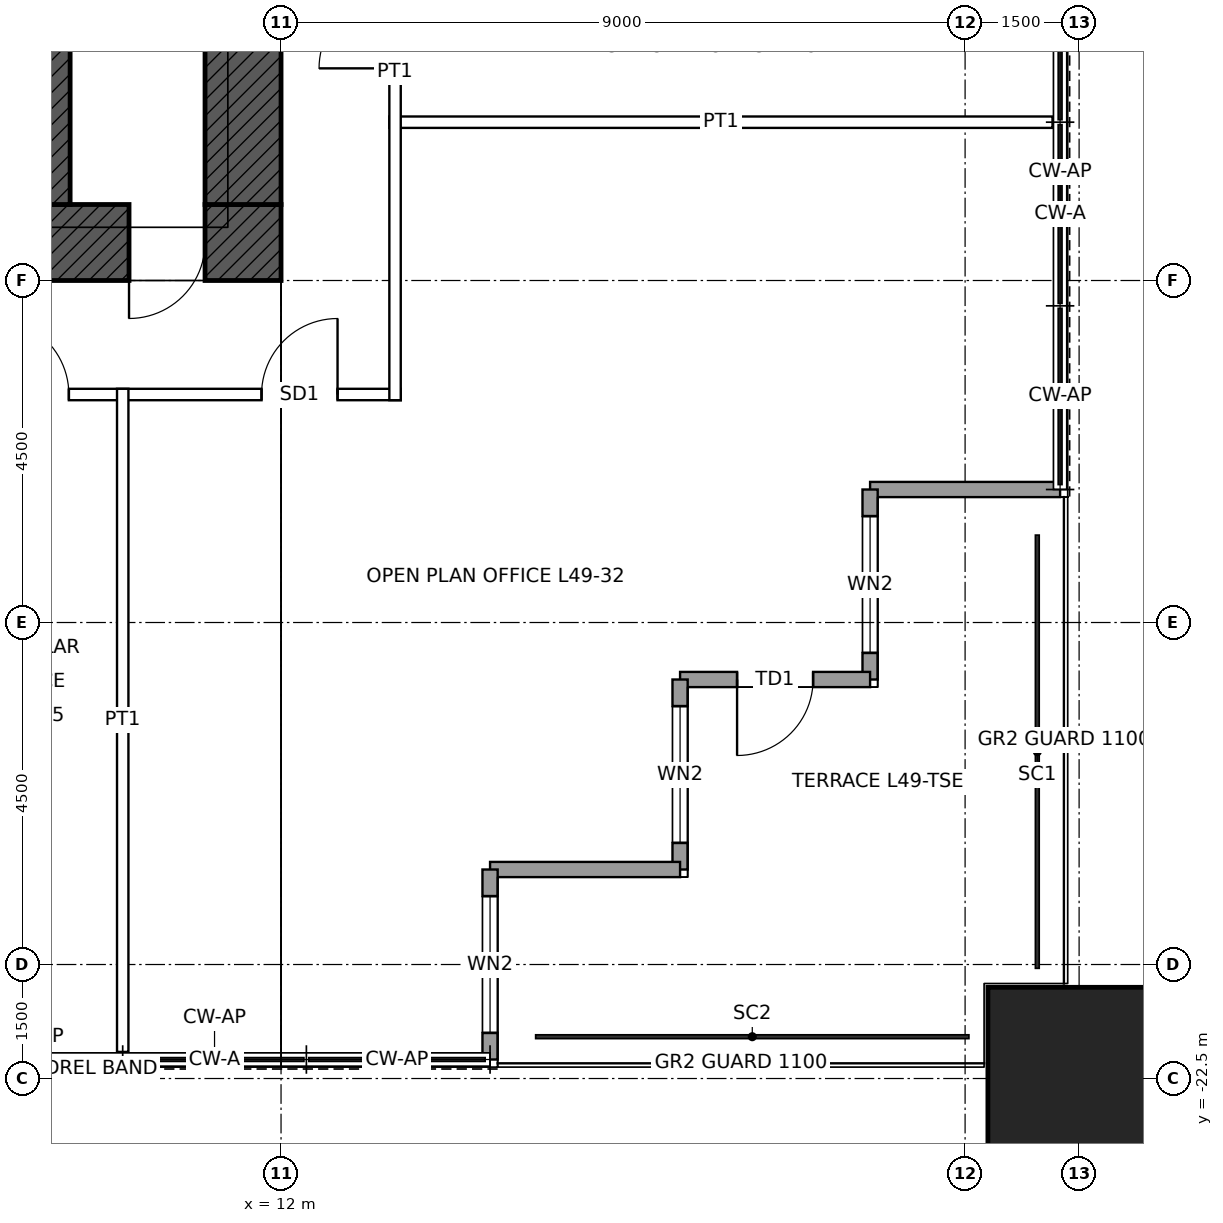
"""IFC4 building model, lengths in metres.
Left out: names, types, materials, properties, quantities, classifications, styles, units other than length and angle.
Written with IfcOpenShell. Run it as: python <this file> out.ifc"""

import sys

from ifc_helpers import new_model, si_unit, direction, frame, frame_2d, origin, origin_2d, place, context, subcontext, project, spatial, rectangle, hollow_rectangle, extrude, element, fill, save


model = new_model("IFC4")
c1 = context("Model", 3, precision=1e-05, world=origin(), true_north=direction((0.0, 1.0)))
c2 = subcontext(c1, "Body", "Model", "MODEL_VIEW")
j1 = project(units=[si_unit("LENGTHUNIT", "METRE"), si_unit("PLANEANGLEUNIT", "RADIAN")], contexts=[c1])
p1 = place(None, origin())
s1 = spatial("IfcSite", under=j1, at=p1, CompositionType="ELEMENT")
p2 = place(p1, origin())
s2 = spatial("IfcBuilding", under=s1, at=p2, CompositionType="ELEMENT")
p3 = place(p2, frame((0.0, 0.0, 229.9)))
s3 = spatial("IfcBuildingStorey", under=s2, at=p3, CompositionType="ELEMENT", Elevation=229.9)
p4 = place(p3, frame((22.5, -22.5, 0.0), z_axis=(0.0, 0.0, 1.0), x_axis=(1.0, 0.0, 0.0)))
e1 = element("IfcColumn", 1, at=p4, inside=s3, PredefinedType="COLUMN", context=c2, shape_type="SweptSolid", body=[
    extrude(hollow_rectangle(XDim=2.4, YDim=2.4, WallThickness=0.12, at=origin_2d()), origin(), (0.0, 0.0, 1.0), 4.0),
])
p5 = place(p3, frame((12.0, -11.5, 0.0), z_axis=(0.0, 0.0, 1.0), x_axis=(-1.0, 0.0, 0.0)))
e2 = element("IfcWall", 2, at=p5, inside=s3, PredefinedType="SHEAR", context=c2, shape_type="SweptSolid", body=[
    extrude(rectangle(XDim=24.0, YDim=1.0, at=frame_2d((12.0, 0.0))), origin(), (0.0, 0.0, 1.0), 4.0),
])
p6 = place(p5, frame((11.5, 0.0, 0.0)))
e3 = element("IfcOpeningElement", 3, at=p6, cuts=e2, PredefinedType="OPENING", context=c2, shape_type="SweptSolid", body=[
    extrude(rectangle(XDim=1.0, YDim=2.1, at=frame_2d((0.5, 1.05))), frame((0.0, 0.51, 0.0), z_axis=(0.0, -1.0, 0.0), x_axis=(1.0, 0.0, 0.0)), (0.0, 0.0, 1.0), 1.02),
])
p7 = place(p5, frame((1.0, 0.0, 0.0)))
e4 = element("IfcOpeningElement", 4, at=p7, cuts=e2, PredefinedType="OPENING", context=c2, shape_type="SweptSolid", body=[
    extrude(rectangle(XDim=1.0, YDim=2.4, at=frame_2d((0.5, 1.2))), frame((0.0, 0.51, 0.0), z_axis=(0.0, -1.0, 0.0), x_axis=(1.0, 0.0, 0.0)), (0.0, 0.0, 1.0), 1.02),
])
p8 = place(p3, frame((11.5, 11.0, 0.0), z_axis=(0.0, 0.0, 1.0), x_axis=(0.0, -1.0, 0.0)))
e5 = element("IfcWall", 5, at=p8, inside=s3, PredefinedType="SHEAR", context=c2, shape_type="SweptSolid", body=[
    extrude(rectangle(XDim=22.0, YDim=1.0, at=frame_2d((11.0, 0.0))), origin(), (0.0, 0.0, 1.0), 4.0),
])
p9 = place(p8, frame((10.5, 0.0, 0.0)))
e6 = element("IfcOpeningElement", 6, at=p9, cuts=e5, PredefinedType="OPENING", context=c2, shape_type="SweptSolid", body=[
    extrude(rectangle(XDim=1.0, YDim=2.4, at=frame_2d((0.5, 1.2))), frame((0.0, 0.51, 0.0), z_axis=(0.0, -1.0, 0.0), x_axis=(1.0, 0.0, 0.0)), (0.0, 0.0, 1.0), 1.02),
])
p10 = place(p3, frame((9.0, -11.0, 0.0), z_axis=(0.0, 0.0, 1.0), x_axis=(0.0, 1.0, 0.0)))
e7 = element("IfcWall", 7, at=p10, inside=s3, PredefinedType="SHEAR", context=c2, shape_type="SweptSolid", body=[
    extrude(rectangle(XDim=6.5, YDim=0.45, at=frame_2d((3.25, 0.0))), origin(), (0.0, 0.0, 1.0), 4.0),
])
p11 = place(p10, frame((4.25, 0.0, 0.0)))
e8 = element("IfcOpeningElement", 8, at=p11, cuts=e7, PredefinedType="OPENING", context=c2, shape_type="SweptSolid", body=[
    extrude(rectangle(XDim=1.0, YDim=2.1, at=frame_2d((0.5, 1.05))), frame((0.0, 0.235, 0.0), z_axis=(0.0, -1.0, 0.0), x_axis=(1.0, 0.0, 0.0)), (0.0, 0.0, 1.0), 0.47),
])
p12 = place(p3, frame((22.25, -14.75, 0.0), z_axis=(0.0, 0.0, 1.0), x_axis=(-1.0, 0.0, 0.0)))
e9 = element("IfcWall", 9, at=p12, inside=s3, PredefinedType="SOLIDWALL", context=c2, shape_type="SweptSolid", body=[
    extrude(rectangle(XDim=2.5, YDim=0.2, at=frame_2d((1.25, 0.0))), origin(), (0.0, 0.0, 1.0), 3.85),
])
p13 = place(p3, frame((19.75, -14.75, 0.0), z_axis=(0.0, 0.0, 1.0), x_axis=(0.0, -1.0, 0.0)))
e10 = element("IfcWall", 10, at=p13, inside=s3, PredefinedType="SOLIDWALL", context=c2, shape_type="SweptSolid", body=[
    extrude(rectangle(XDim=2.5, YDim=0.2, at=frame_2d((1.25, 0.0))), origin(), (0.0, 0.0, 1.0), 3.85),
])
p14 = place(p13, frame((0.35, 0.0, 0.3)))
e11 = element("IfcOpeningElement", 11, at=p14, cuts=e10, PredefinedType="OPENING", context=c2, shape_type="SweptSolid", body=[
    extrude(rectangle(XDim=1.8, YDim=2.4, at=frame_2d((0.9, 1.2))), frame((0.0, 0.11, 0.0), z_axis=(0.0, -1.0, 0.0), x_axis=(1.0, 0.0, 0.0)), (0.0, 0.0, 1.0), 0.22),
])
p15 = place(p3, frame((19.75, -17.25, 0.0), z_axis=(0.0, 0.0, 1.0), x_axis=(-1.0, 0.0, 0.0)))
e12 = element("IfcWall", 12, at=p15, inside=s3, PredefinedType="SOLIDWALL", context=c2, shape_type="SweptSolid", body=[
    extrude(rectangle(XDim=2.5, YDim=0.2, at=frame_2d((1.25, 0.0))), origin(), (0.0, 0.0, 1.0), 3.85),
])
p16 = place(p15, frame((0.75, 0.0, 0.0)))
e13 = element("IfcOpeningElement", 13, at=p16, cuts=e12, PredefinedType="OPENING", context=c2, shape_type="SweptSolid", body=[
    extrude(rectangle(XDim=1.0, YDim=2.4, at=frame_2d((0.5, 1.2))), frame((0.0, 0.11, 0.0), z_axis=(0.0, -1.0, 0.0), x_axis=(1.0, 0.0, 0.0)), (0.0, 0.0, 1.0), 0.22),
])
p17 = place(p3, frame((17.25, -17.25, 0.0), z_axis=(0.0, 0.0, 1.0), x_axis=(0.0, -1.0, 0.0)))
e14 = element("IfcWall", 14, at=p17, inside=s3, PredefinedType="SOLIDWALL", context=c2, shape_type="SweptSolid", body=[
    extrude(rectangle(XDim=2.5, YDim=0.2, at=frame_2d((1.25, 0.0))), origin(), (0.0, 0.0, 1.0), 3.85),
])
p18 = place(p17, frame((0.35, 0.0, 0.3)))
e15 = element("IfcOpeningElement", 15, at=p18, cuts=e14, PredefinedType="OPENING", context=c2, shape_type="SweptSolid", body=[
    extrude(rectangle(XDim=1.8, YDim=2.4, at=frame_2d((0.9, 1.2))), frame((0.0, 0.11, 0.0), z_axis=(0.0, -1.0, 0.0), x_axis=(1.0, 0.0, 0.0)), (0.0, 0.0, 1.0), 0.22),
])
p19 = place(p3, frame((17.25, -19.75, 0.0), z_axis=(0.0, 0.0, 1.0), x_axis=(-1.0, 0.0, 0.0)))
e16 = element("IfcWall", 16, at=p19, inside=s3, PredefinedType="SOLIDWALL", context=c2, shape_type="SweptSolid", body=[
    extrude(rectangle(XDim=2.5, YDim=0.2, at=frame_2d((1.25, 0.0))), origin(), (0.0, 0.0, 1.0), 3.85),
])
p20 = place(p3, frame((14.75, -19.75, 0.0), z_axis=(0.0, 0.0, 1.0), x_axis=(0.0, -1.0, 0.0)))
e17 = element("IfcWall", 17, at=p20, inside=s3, PredefinedType="SOLIDWALL", context=c2, shape_type="SweptSolid", body=[
    extrude(rectangle(XDim=2.5, YDim=0.2, at=frame_2d((1.25, 0.0))), origin(), (0.0, 0.0, 1.0), 3.85),
])
p21 = place(p20, frame((0.35, 0.0, 0.3)))
e18 = element("IfcOpeningElement", 18, at=p21, cuts=e17, PredefinedType="OPENING", context=c2, shape_type="SweptSolid", body=[
    extrude(rectangle(XDim=1.8, YDim=2.4, at=frame_2d((0.9, 1.2))), frame((0.0, 0.11, 0.0), z_axis=(0.0, -1.0, 0.0), x_axis=(1.0, 0.0, 0.0)), (0.0, 0.0, 1.0), 0.22),
])
p22 = place(p3, frame((-13.575, -13.5, 0.0), z_axis=(0.0, 0.0, 1.0), x_axis=(1.0, 0.0, 0.0)))
e19 = element("IfcWall", 19, at=p22, inside=s3, PredefinedType="PARTITIONING", context=c2, shape_type="SweptSolid", body=[
    extrude(rectangle(XDim=27.15, YDim=0.15, at=frame_2d((13.575, 0.0))), origin(), (0.0, 0.0, 1.0), 3.85),
])
p23 = place(p22, frame((21.783, 0.0, 0.0)))
e20 = element("IfcOpeningElement", 20, at=p23, cuts=e19, PredefinedType="OPENING", context=c2, shape_type="SweptSolid", body=[
    extrude(rectangle(XDim=1.0, YDim=2.1, at=frame_2d((0.5, 1.05))), frame((0.0, 0.085, 0.0), z_axis=(0.0, -1.0, 0.0), x_axis=(1.0, 0.0, 0.0)), (0.0, 0.0, 1.0), 0.17),
])
p24 = place(p22, frame((19.325, 0.0, 0.0)))
e21 = element("IfcOpeningElement", 21, at=p24, cuts=e19, PredefinedType="OPENING", context=c2, shape_type="SweptSolid", body=[
    extrude(rectangle(XDim=1.0, YDim=2.1, at=frame_2d((0.5, 1.05))), frame((0.0, 0.085, 0.0), z_axis=(0.0, -1.0, 0.0), x_axis=(1.0, 0.0, 0.0)), (0.0, 0.0, 1.0), 0.17),
])
p25 = place(p22, frame((16.825, 0.0, 0.0)))
e22 = element("IfcOpeningElement", 22, at=p25, cuts=e19, PredefinedType="OPENING", context=c2, shape_type="SweptSolid", body=[
    extrude(rectangle(XDim=1.0, YDim=2.1, at=frame_2d((0.5, 1.05))), frame((0.0, 0.085, 0.0), z_axis=(0.0, -1.0, 0.0), x_axis=(1.0, 0.0, 0.0)), (0.0, 0.0, 1.0), 0.17),
])
p26 = place(p22, frame((14.675, 0.0, 0.0)))
e23 = element("IfcOpeningElement", 23, at=p26, cuts=e19, PredefinedType="OPENING", context=c2, shape_type="SweptSolid", body=[
    extrude(rectangle(XDim=1.0, YDim=2.1, at=frame_2d((0.5, 1.05))), frame((0.0, 0.085, 0.0), z_axis=(0.0, -1.0, 0.0), x_axis=(1.0, 0.0, 0.0)), (0.0, 0.0, 1.0), 0.17),
])
p27 = place(p22, frame((11.475, 0.0, 0.0)))
e24 = element("IfcOpeningElement", 24, at=p27, cuts=e19, PredefinedType="OPENING", context=c2, shape_type="SweptSolid", body=[
    extrude(rectangle(XDim=1.0, YDim=2.1, at=frame_2d((0.5, 1.05))), frame((0.0, 0.085, 0.0), z_axis=(0.0, -1.0, 0.0), x_axis=(1.0, 0.0, 0.0)), (0.0, 0.0, 1.0), 0.17),
])
p28 = place(p22, frame((9.325, 0.0, 0.0)))
e25 = element("IfcOpeningElement", 25, at=p28, cuts=e19, PredefinedType="OPENING", context=c2, shape_type="SweptSolid", body=[
    extrude(rectangle(XDim=1.0, YDim=2.1, at=frame_2d((0.5, 1.05))), frame((0.0, 0.085, 0.0), z_axis=(0.0, -1.0, 0.0), x_axis=(1.0, 0.0, 0.0)), (0.0, 0.0, 1.0), 0.17),
])
p29 = place(p22, frame((6.825, 0.0, 0.0)))
e26 = element("IfcOpeningElement", 26, at=p29, cuts=e19, PredefinedType="OPENING", context=c2, shape_type="SweptSolid", body=[
    extrude(rectangle(XDim=1.0, YDim=2.1, at=frame_2d((0.5, 1.05))), frame((0.0, 0.085, 0.0), z_axis=(0.0, -1.0, 0.0), x_axis=(1.0, 0.0, 0.0)), (0.0, 0.0, 1.0), 0.17),
])
p30 = place(p22, frame((4.366, 0.0, 0.0)))
e27 = element("IfcOpeningElement", 27, at=p30, cuts=e19, PredefinedType="OPENING", context=c2, shape_type="SweptSolid", body=[
    extrude(rectangle(XDim=1.0, YDim=2.1, at=frame_2d((0.5, 1.05))), frame((0.0, 0.085, 0.0), z_axis=(0.0, -1.0, 0.0), x_axis=(1.0, 0.0, 0.0)), (0.0, 0.0, 1.0), 0.17),
])
p31 = place(p22, frame((25.318, 0.0, 0.0)))
e28 = element("IfcOpeningElement", 28, at=p31, cuts=e19, PredefinedType="OPENING", context=c2, shape_type="SweptSolid", body=[
    extrude(rectangle(XDim=1.0, YDim=2.4, at=frame_2d((0.5, 1.2))), frame((0.0, 0.085, 0.0), z_axis=(0.0, -1.0, 0.0), x_axis=(1.0, 0.0, 0.0)), (0.0, 0.0, 1.0), 0.17),
])
p32 = place(p22, frame((1.366, 0.0, 0.0)))
e29 = element("IfcOpeningElement", 29, at=p32, cuts=e19, PredefinedType="OPENING", context=c2, shape_type="SweptSolid", body=[
    extrude(rectangle(XDim=1.0, YDim=2.4, at=frame_2d((0.5, 1.2))), frame((0.0, 0.085, 0.0), z_axis=(0.0, -1.0, 0.0), x_axis=(1.0, 0.0, 0.0)), (0.0, 0.0, 1.0), 0.17),
])
for number, where, z_axis, x_axis in (
    (30, (13.425, -9.917, 0.0), (0.0, 0.0, 1.0), (1.0, 0.0, 0.0)),
    (31, (9.917, -22.15, 0.0), (0.0, 0.0, 1.0), (0.0, 1.0, 0.0)),
):
    element("IfcWall", number, at=place(p3, frame(where, z_axis=z_axis, x_axis=x_axis)), inside=s3, PredefinedType="PARTITIONING", context=c2, shape_type="SweptSolid", body=[
        extrude(rectangle(XDim=8.725, YDim=0.15, at=frame_2d((4.362, 0.0))), origin(), (0.0, 0.0, 1.0), 3.85),
    ])
p33 = place(p3, frame((13.5, -13.575, 0.0), z_axis=(0.0, 0.0, 1.0), x_axis=(0.0, 1.0, 0.0)))
e32 = element("IfcWall", 32, at=p33, inside=s3, PredefinedType="PARTITIONING", context=c2, shape_type="SweptSolid", body=[
    extrude(rectangle(XDim=8.65, YDim=0.15, at=frame_2d((4.325, 0.0))), origin(), (0.0, 0.0, 1.0), 3.85),
])
p34 = place(p33, frame((6.825, 0.0, 0.0)))
e33 = element("IfcOpeningElement", 33, at=p34, cuts=e32, PredefinedType="OPENING", context=c2, shape_type="SweptSolid", body=[
    extrude(rectangle(XDim=1.0, YDim=2.1, at=frame_2d((0.5, 1.05))), frame((0.0, 0.085, 0.0), z_axis=(0.0, -1.0, 0.0), x_axis=(1.0, 0.0, 0.0)), (0.0, 0.0, 1.0), 0.17),
])
p35 = place(p33, frame((4.366, 0.0, 0.0)))
e34 = element("IfcOpeningElement", 34, at=p35, cuts=e32, PredefinedType="OPENING", context=c2, shape_type="SweptSolid", body=[
    extrude(rectangle(XDim=1.0, YDim=2.1, at=frame_2d((0.5, 1.05))), frame((0.0, 0.085, 0.0), z_axis=(0.0, -1.0, 0.0), x_axis=(1.0, 0.0, 0.0)), (0.0, 0.0, 1.0), 0.17),
])
p36 = place(p14, origin())
e35 = element("IfcWindow", 35, at=p36, inside=s3, PartitioningType="SINGLE_PANEL", PredefinedType="WINDOW", context=c2, shape_type="SweptSolid", body=[
    extrude(rectangle(XDim=1.8, YDim=2.4, at=frame_2d((0.9, 1.2))), frame((0.0, 0.03, 0.0), z_axis=(0.0, -1.0, 0.0), x_axis=(1.0, 0.0, 0.0)), (0.0, 0.0, 1.0), 0.06),
])
fill(e11, e35)
p37 = place(p16, origin())
e36 = element("IfcDoor", 36, at=p37, inside=s3, OperationType="SINGLE_SWING_RIGHT", PredefinedType="DOOR", context=c2, shape_type="SweptSolid", body=[
    extrude(rectangle(XDim=1.0, YDim=2.4, at=frame_2d((0.5, 1.2))), frame((0.0, 0.025, 0.0), z_axis=(0.0, -1.0, 0.0), x_axis=(1.0, 0.0, 0.0)), (0.0, 0.0, 1.0), 0.05),
])
fill(e13, e36)
p38 = place(p18, origin())
e37 = element("IfcWindow", 37, at=p38, inside=s3, PartitioningType="SINGLE_PANEL", PredefinedType="WINDOW", context=c2, shape_type="SweptSolid", body=[
    extrude(rectangle(XDim=1.8, YDim=2.4, at=frame_2d((0.9, 1.2))), frame((0.0, 0.03, 0.0), z_axis=(0.0, -1.0, 0.0), x_axis=(1.0, 0.0, 0.0)), (0.0, 0.0, 1.0), 0.06),
])
fill(e15, e37)
p39 = place(p21, origin())
e38 = element("IfcWindow", 38, at=p39, inside=s3, PartitioningType="SINGLE_PANEL", PredefinedType="WINDOW", context=c2, shape_type="SweptSolid", body=[
    extrude(rectangle(XDim=1.8, YDim=2.4, at=frame_2d((0.9, 1.2))), frame((0.0, 0.03, 0.0), z_axis=(0.0, -1.0, 0.0), x_axis=(1.0, 0.0, 0.0)), (0.0, 0.0, 1.0), 0.06),
])
fill(e18, e38)
p40 = place(p7, origin())
e39 = element("IfcDoor", 39, at=p40, inside=s3, OperationType="SINGLE_SWING_RIGHT", PredefinedType="DOOR", context=c2, shape_type="SweptSolid", body=[
    extrude(rectangle(XDim=1.0, YDim=2.4, at=frame_2d((0.5, 1.2))), frame((0.0, 0.485, 0.0), z_axis=(0.0, -1.0, 0.0), x_axis=(1.0, 0.0, 0.0)), (0.0, 0.0, 1.0), 0.05),
])
fill(e4, e39)
p41 = place(p35, origin())
e40 = element("IfcDoor", 40, at=p41, inside=s3, OperationType="SINGLE_SWING_LEFT", PredefinedType="DOOR", context=c2, shape_type="SweptSolid", body=[
    extrude(rectangle(XDim=1.0, YDim=2.1, at=frame_2d((0.5, 1.05))), frame((0.0, 0.025, 0.0), z_axis=(0.0, -1.0, 0.0), x_axis=(1.0, 0.0, 0.0)), (0.0, 0.0, 1.0), 0.05),
])
fill(e34, e40)
p42 = place(p23, origin())
e41 = element("IfcDoor", 41, at=p42, inside=s3, OperationType="SINGLE_SWING_LEFT", PredefinedType="DOOR", context=c2, shape_type="SweptSolid", body=[
    extrude(rectangle(XDim=1.0, YDim=2.1, at=frame_2d((0.5, 1.05))), frame((0.0, 0.025, 0.0), z_axis=(0.0, -1.0, 0.0), x_axis=(1.0, 0.0, 0.0)), (0.0, 0.0, 1.0), 0.05),
])
fill(e20, e41)
p43 = place(p31, origin())
e42 = element("IfcDoor", 42, at=p43, inside=s3, OperationType="SINGLE_SWING_RIGHT", PredefinedType="DOOR", context=c2, shape_type="SweptSolid", body=[
    extrude(rectangle(XDim=1.0, YDim=2.4, at=frame_2d((0.5, 1.2))), frame((0.0, 0.025, 0.0), z_axis=(0.0, -1.0, 0.0), x_axis=(1.0, 0.0, 0.0)), (0.0, 0.0, 1.0), 0.05),
])
fill(e28, e42)
save(model, sys.argv[1])
